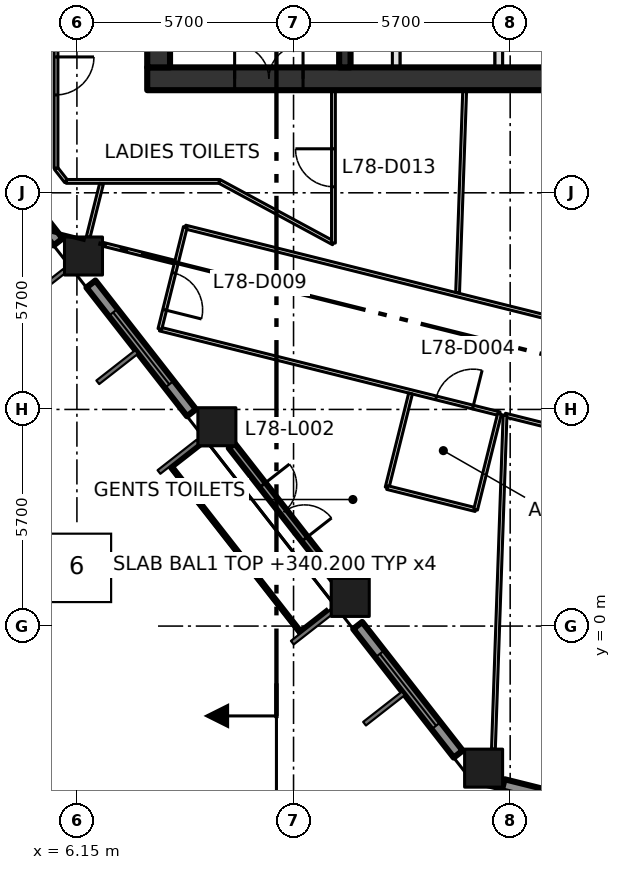
"""IFC4 building model, lengths in metres.
Left out: names, types, materials, properties, quantities, classifications, styles, units other than length and angle.
Written with IfcOpenShell. Run it as: python <this file> out.ifc"""

import sys

from ifc_helpers import new_model, si_unit, direction, frame, frame_2d, origin, origin_2d, place, context, subcontext, project, spatial, rectangle, extrude, element, fill, save


model = new_model("IFC4")
c1 = context("Model", 3, precision=1e-05, world=origin(), true_north=direction((0.0, 1.0)))
c2 = subcontext(c1, "Body", "Model", "MODEL_VIEW")
j1 = project(units=[si_unit("LENGTHUNIT", "METRE"), si_unit("PLANEANGLEUNIT", "RADIAN")], contexts=[c1])
p1 = place(None, origin())
s1 = spatial("IfcSite", under=j1, at=p1, CompositionType="ELEMENT")
p2 = place(p1, origin())
s2 = spatial("IfcBuilding", under=s1, at=p2, CompositionType="ELEMENT")
p3 = place(p2, frame((0.0, 0.0, 340.2)))
s3 = spatial("IfcBuildingStorey", under=s2, at=p3, CompositionType="ELEMENT", Elevation=340.2)
for number, where, z_axis, x_axis in (
    (1, (16.851, -3.738, 0.0), (0.0, 0.0, 1.0), (1.0, 0.0, 0.0)),
    (2, (13.342, 0.754, 0.0), (0.0, 0.0, 1.0), (1.0, 0.0, 0.0)),
    (3, (9.833, 5.245, 0.0), (0.0, 0.0, 1.0), (1.0, 0.0, 0.0)),
    (4, (6.323, 9.737, 0.0), (0.0, 0.0, 1.0), (1.0, 0.0, 0.0)),
):
    element("IfcColumn", number, at=place(p3, frame(where, z_axis=z_axis, x_axis=x_axis)), inside=s3, PredefinedType="COLUMN", context=c2, shape_type="SweptSolid", body=[
        extrude(rectangle(XDim=1.0, YDim=1.0, at=origin_2d()), origin(), (0.0, 0.0, 1.0), 4.2),
    ])
p4 = place(p3, frame((8.0, 14.4, -0.3), z_axis=(0.0, 0.0, 1.0), x_axis=(1.0, 0.0, 0.0)))
e5 = element("IfcWall", 5, at=p4, inside=s3, PredefinedType="SHEAR", context=c2, shape_type="SweptSolid", body=[
    extrude(rectangle(XDim=22.8, YDim=0.6, at=frame_2d((11.4, 0.0))), origin(), (0.0, 0.0, 1.0), 4.2),
])
p5 = place(p4, frame((2.3, 0.0, 0.3)))
e6 = element("IfcOpeningElement", 6, at=p5, cuts=e5, PredefinedType="OPENING", context=c2, shape_type="SweptSolid", body=[
    extrude(rectangle(XDim=1.8, YDim=2.1, at=frame_2d((0.9, 1.05))), frame((0.0, 0.31, 0.0), z_axis=(0.0, -1.0, 0.0), x_axis=(1.0, 0.0, 0.0)), (0.0, 0.0, 1.0), 0.62),
])
p6 = place(p3, frame((8.3, 14.7, -0.3), z_axis=(0.0, 0.0, 1.0), x_axis=(0.0, 1.0, 0.0)))
e7 = element("IfcWall", 7, at=p6, inside=s3, PredefinedType="SHEAR", context=c2, shape_type="SweptSolid", body=[
    extrude(rectangle(XDim=21.0, YDim=0.6, at=frame_2d((10.5, 0.0))), origin(), (0.0, 0.0, 1.0), 4.2),
])
p7 = place(p3, frame((13.2, 14.7, 0.0), z_axis=(0.0, 0.0, 1.0), x_axis=(0.0, 1.0, 0.0)))
e8 = element("IfcWall", 8, at=p7, inside=s3, PredefinedType="SHEAR", context=c2, shape_type="SweptSolid", body=[
    extrude(rectangle(XDim=21.0, YDim=0.3, at=frame_2d((10.5, 0.0))), origin(), (0.0, 0.0, 1.0), 3.9),
])
p8 = place(p7, frame((3.6, 0.0, 0.0)))
e9 = element("IfcOpeningElement", 9, at=p8, cuts=e8, PredefinedType="OPENING", context=c2, shape_type="SweptSolid", body=[
    extrude(rectangle(XDim=1.8, YDim=2.1, at=frame_2d((0.9, 1.05))), frame((0.0, 0.16, 0.0), z_axis=(0.0, -1.0, 0.0), x_axis=(1.0, 0.0, 0.0)), (0.0, 0.0, 1.0), 0.32),
])
p9 = place(p7, frame((11.7, 0.0, 0.0)))
e10 = element("IfcOpeningElement", 10, at=p9, cuts=e8, PredefinedType="OPENING", context=c2, shape_type="SweptSolid", body=[
    extrude(rectangle(XDim=1.2, YDim=2.1, at=frame_2d((0.6, 1.05))), frame((0.0, 0.16, 0.0), z_axis=(0.0, -1.0, 0.0), x_axis=(1.0, 0.0, 0.0)), (0.0, 0.0, 1.0), 0.32),
])
for number, where, z_axis, x_axis in (
    (11, (14.55, 14.7, 0.0), (0.0, 0.0, 1.0), (0.0, 1.0, 0.0)),
    (12, (17.25, 14.7, 0.0), (0.0, 0.0, 1.0), (0.0, 1.0, 0.0)),
):
    element("IfcWall", number, at=place(p3, frame(where, z_axis=z_axis, x_axis=x_axis)), inside=s3, PredefinedType="SOLIDWALL", context=c2, shape_type="SweptSolid", body=[
        extrude(rectangle(XDim=2.9, YDim=0.2, at=frame_2d((1.45, 0.0))), origin(), (0.0, 0.0, 1.0), 3.9),
    ])
p10 = place(p3, frame((3.01, 13.491, 0.0), z_axis=(0.0, 0.0, 1.0), x_axis=(0.615713519567, -0.787970089421, 0.0)))
e13 = element("IfcWall", 13, at=p10, inside=s3, PredefinedType="SOLIDWALL", context=c2, shape_type="SweptSolid", body=[
    extrude(rectangle(XDim=4.296, YDim=0.3, at=frame_2d((2.148, 0.0))), origin(), (0.0, 0.0, 1.0), 3.2),
])
p11 = place(p10, frame((0.948, 0.0, 0.8)))
e14 = element("IfcOpeningElement", 14, at=p11, cuts=e13, PredefinedType="OPENING", context=c2, shape_type="SweptSolid", body=[
    extrude(rectangle(XDim=2.4, YDim=2.1, at=frame_2d((1.2, 1.05))), frame((0.0, 0.16, 0.0), z_axis=(0.0, -1.0, 0.0), x_axis=(1.0, 0.0, 0.0)), (0.0, 0.0, 1.0), 0.32),
])
p12 = place(p3, frame((6.519, 9.0, 0.0), z_axis=(0.0, 0.0, 1.0), x_axis=(0.615634121154, -0.788032124263, 0.0)))
e15 = element("IfcWall", 15, at=p12, inside=s3, PredefinedType="SOLIDWALL", context=c2, shape_type="SweptSolid", body=[
    extrude(rectangle(XDim=4.298, YDim=0.3, at=frame_2d((2.149, 0.0))), origin(), (0.0, 0.0, 1.0), 3.2),
])
p13 = place(p12, frame((0.949, 0.0, 0.8)))
e16 = element("IfcOpeningElement", 16, at=p13, cuts=e15, PredefinedType="OPENING", context=c2, shape_type="SweptSolid", body=[
    extrude(rectangle(XDim=2.4, YDim=2.1, at=frame_2d((1.2, 1.05))), frame((0.0, 0.16, 0.0), z_axis=(0.0, -1.0, 0.0), x_axis=(1.0, 0.0, 0.0)), (0.0, 0.0, 1.0), 0.32),
])
p14 = place(p3, frame((10.224, 4.745, 0.0), z_axis=(0.0, 0.0, 1.0), x_axis=(0.615545644418, -0.788101236922, 0.0)))
e17 = element("IfcWall", 17, at=p14, inside=s3, PredefinedType="SOLIDWALL", context=c2, shape_type="SweptSolid", body=[
    extrude(rectangle(XDim=4.43, YDim=0.2, at=frame_2d((2.215, 0.0))), origin(), (0.0, 0.0, 1.0), 3.2),
])
p15 = place(p14, frame((1.315, 0.0, 0.0)))
e18 = element("IfcOpeningElement", 18, at=p15, cuts=e17, PredefinedType="OPENING", context=c2, shape_type="SweptSolid", body=[
    extrude(rectangle(XDim=1.8, YDim=2.9, at=frame_2d((0.9, 1.45))), frame((0.0, 0.11, 0.0), z_axis=(0.0, -1.0, 0.0), x_axis=(1.0, 0.0, 0.0)), (0.0, 0.0, 1.0), 0.22),
])
p16 = place(p3, frame((8.89, 4.292, 0.0), z_axis=(0.0, 0.0, 1.0), x_axis=(0.615636085037, -0.788030590016, 0.0)))
e19 = element("IfcWall", 19, at=p16, inside=s3, PredefinedType="SOLIDWALL", context=c2, shape_type="SweptSolid", body=[
    extrude(rectangle(XDim=5.359, YDim=0.4, at=frame_2d((2.679, 0.0))), origin(), (0.0, 0.0, 1.0), 0.3),
])
p17 = place(p3, frame((13.538, 0.016, 0.0), z_axis=(0.0, 0.0, 1.0), x_axis=(0.615713519567, -0.787970089421, 0.0)))
e20 = element("IfcWall", 20, at=p17, inside=s3, PredefinedType="SOLIDWALL", context=c2, shape_type="SweptSolid", body=[
    extrude(rectangle(XDim=4.296, YDim=0.3, at=frame_2d((2.148, 0.0))), origin(), (0.0, 0.0, 1.0), 3.2),
])
p18 = place(p17, frame((0.948, 0.0, 0.8)))
e21 = element("IfcOpeningElement", 21, at=p18, cuts=e20, PredefinedType="OPENING", context=c2, shape_type="SweptSolid", body=[
    extrude(rectangle(XDim=2.4, YDim=2.1, at=frame_2d((1.2, 1.05))), frame((0.0, 0.16, 0.0), z_axis=(0.0, -1.0, 0.0), x_axis=(1.0, 0.0, 0.0)), (0.0, 0.0, 1.0), 0.32),
])
p19 = place(p3, frame((17.367, -4.176, 0.0), z_axis=(0.0, 0.0, 1.0), x_axis=(0.970327846266, -0.241793032904, 0.0)))
e22 = element("IfcWall", 22, at=p19, inside=s3, PredefinedType="SOLIDWALL", context=c2, shape_type="SweptSolid", body=[
    extrude(rectangle(XDim=4.487, YDim=0.3, at=frame_2d((2.244, 0.0))), origin(), (0.0, 0.0, 1.0), 3.2),
])
p20 = place(p19, frame((1.044, 0.0, 0.8)))
e23 = element("IfcOpeningElement", 23, at=p20, cuts=e22, PredefinedType="OPENING", context=c2, shape_type="SweptSolid", body=[
    extrude(rectangle(XDim=2.4, YDim=2.1, at=frame_2d((1.2, 1.05))), frame((0.0, 0.16, 0.0), z_axis=(0.0, -1.0, 0.0), x_axis=(1.0, 0.0, 0.0)), (0.0, 0.0, 1.0), 0.32),
])
p21 = place(p3, frame((5.6, 12.044, 0.0), z_axis=(0.0, 0.0, 1.0), x_axis=(0.614328236968, -0.789050579661, 0.0)))
e24 = element("IfcWall", 24, at=p21, inside=s3, PredefinedType="PARTITIONING", context=c2, shape_type="SweptSolid", body=[
    extrude(rectangle(XDim=0.436, YDim=0.1, at=frame_2d((0.218, 0.0))), origin(), (0.0, 0.0, 1.0), 3.9),
])
p22 = place(p3, frame((5.6, 39.3, 0.0), z_axis=(0.0, 0.0, 1.0), x_axis=(0.0, -1.0, 0.0)))
e25 = element("IfcWall", 25, at=p22, inside=s3, PredefinedType="PARTITIONING", context=c2, shape_type="SweptSolid", body=[
    extrude(rectangle(XDim=27.256, YDim=0.1, at=frame_2d((13.628, 0.0))), origin(), (0.0, 0.0, 1.0), 3.9),
])
p23 = place(p22, frame((24.325, 0.0, 0.0)))
e26 = element("IfcOpeningElement", 26, at=p23, cuts=e25, PredefinedType="OPENING", context=c2, shape_type="SweptSolid", body=[
    extrude(rectangle(XDim=1.0, YDim=2.1, at=frame_2d((0.5, 1.05))), frame((0.0, 0.06, 0.0), z_axis=(0.0, -1.0, 0.0), x_axis=(1.0, 0.0, 0.0)), (0.0, 0.0, 1.0), 0.12),
])
p24 = place(p22, frame((12.825, 0.0, 0.0)))
e27 = element("IfcOpeningElement", 27, at=p24, cuts=e25, PredefinedType="OPENING", context=c2, shape_type="SweptSolid", body=[
    extrude(rectangle(XDim=1.0, YDim=2.1, at=frame_2d((0.5, 1.05))), frame((0.0, 0.06, 0.0), z_axis=(0.0, -1.0, 0.0), x_axis=(1.0, 0.0, 0.0)), (0.0, 0.0, 1.0), 0.12),
])
p25 = place(p3, frame((5.868, 11.7, 0.0), z_axis=(0.0, 0.0, 1.0), x_axis=(1.0, 0.0, 0.0)))
e28 = element("IfcWall", 28, at=p25, inside=s3, PredefinedType="PARTITIONING", context=c2, shape_type="SweptSolid", body=[
    extrude(rectangle(XDim=4.032, YDim=0.1, at=frame_2d((2.016, 0.0))), origin(), (0.0, 0.0, 1.0), 3.9),
])
p26 = place(p3, frame((8.333, 7.815, 0.0), z_axis=(0.0, 0.0, 1.0), x_axis=(0.970301331289, -0.241899414012, 0.0)))
e29 = element("IfcWall", 29, at=p26, inside=s3, PredefinedType="PARTITIONING", context=c2, shape_type="SweptSolid", body=[
    extrude(rectangle(XDim=9.21, YDim=0.1, at=frame_2d((4.605, 0.0))), origin(), (0.0, 0.0, 1.0), 3.9),
])
p27 = place(p26, frame((7.49, 0.0, 0.0)))
e30 = element("IfcOpeningElement", 30, at=p27, cuts=e29, PredefinedType="OPENING", context=c2, shape_type="SweptSolid", body=[
    extrude(rectangle(XDim=1.0, YDim=2.1, at=frame_2d((0.5, 1.05))), frame((0.0, 0.06, 0.0), z_axis=(0.0, -1.0, 0.0), x_axis=(1.0, 0.0, 0.0)), (0.0, 0.0, 1.0), 0.12),
])
p28 = place(p3, frame((9.002, 10.499, 0.0), z_axis=(0.0, 0.0, 1.0), x_axis=(0.970298340477, -0.241911410372, 0.0)))
e31 = element("IfcWall", 31, at=p28, inside=s3, PredefinedType="PARTITIONING", context=c2, shape_type="SweptSolid", body=[
    extrude(rectangle(XDim=19.88, YDim=0.1, at=frame_2d((9.94, 0.0))), origin(), (0.0, 0.0, 1.0), 3.9),
])
p29 = place(p28, frame((12.749, 0.0, 0.0)))
e32 = element("IfcOpeningElement", 32, at=p29, cuts=e31, PredefinedType="OPENING", context=c2, shape_type="SweptSolid", body=[
    extrude(rectangle(XDim=1.8, YDim=2.1, at=frame_2d((0.9, 1.05))), frame((0.0, 0.06, 0.0), z_axis=(0.0, -1.0, 0.0), x_axis=(1.0, 0.0, 0.0)), (0.0, 0.0, 1.0), 0.12),
])
p30 = place(p3, frame((9.002, 10.499, 0.0), z_axis=(0.0, 0.0, 1.0), x_axis=(-0.2418294893, -0.970318761081, 0.0)))
e33 = element("IfcWall", 33, at=p30, inside=s3, PredefinedType="PARTITIONING", context=c2, shape_type="SweptSolid", body=[
    extrude(rectangle(XDim=2.766, YDim=0.1, at=frame_2d((1.383, 0.0))), origin(), (0.0, 0.0, 1.0), 3.9),
])
p31 = place(p30, frame((1.244, 0.0, 0.0)))
e34 = element("IfcOpeningElement", 34, at=p31, cuts=e33, PredefinedType="OPENING", context=c2, shape_type="SweptSolid", body=[
    extrude(rectangle(XDim=1.0, YDim=2.1, at=frame_2d((0.5, 1.05))), frame((0.0, 0.06, 0.0), z_axis=(0.0, -1.0, 0.0), x_axis=(1.0, 0.0, 0.0)), (0.0, 0.0, 1.0), 0.12),
])
p32 = place(p3, frame((9.9, 11.7, 0.0), z_axis=(0.0, 0.0, 1.0), x_axis=(0.87965147249, -0.475618846291, 0.0)))
e35 = element("IfcWall", 35, at=p32, inside=s3, PredefinedType="PARTITIONING", context=c2, shape_type="SweptSolid", body=[
    extrude(rectangle(XDim=3.41, YDim=0.1, at=frame_2d((1.705, 0.0))), origin(), (0.0, 0.0, 1.0), 3.9),
])
p33 = place(p3, frame((12.9, 10.078, 0.0), z_axis=(0.0, 0.0, 1.0), x_axis=(0.0, 1.0, 0.0)))
e36 = element("IfcWall", 36, at=p33, inside=s3, PredefinedType="PARTITIONING", context=c2, shape_type="SweptSolid", body=[
    extrude(rectangle(XDim=4.022, YDim=0.1, at=frame_2d((2.011, 0.0))), origin(), (0.0, 0.0, 1.0), 3.9),
])
p34 = place(p33, frame((1.48, 0.0, 0.0)))
e37 = element("IfcOpeningElement", 37, at=p34, cuts=e36, PredefinedType="OPENING", context=c2, shape_type="SweptSolid", body=[
    extrude(rectangle(XDim=1.0, YDim=2.1, at=frame_2d((0.5, 1.05))), frame((0.0, 0.06, 0.0), z_axis=(0.0, -1.0, 0.0), x_axis=(1.0, 0.0, 0.0)), (0.0, 0.0, 1.0), 0.12),
])
p35 = place(p3, frame((17.415, 5.551, 0.0), z_axis=(0.0, 0.0, 1.0), x_axis=(0.970298198748, -0.241911978838, 0.0)))
e38 = element("IfcWall", 38, at=p35, inside=s3, PredefinedType="PARTITIONING", context=c2, shape_type="SweptSolid", body=[
    extrude(rectangle(XDim=1.658, YDim=0.1, at=frame_2d((0.829, 0.0))), origin(), (0.0, 0.0, 1.0), 3.9),
])
p36 = place(p3, frame((6.797, 11.638, 0.0), z_axis=(0.0, 0.0, 1.0), x_axis=(-0.242456058691, -0.970162388265, 0.0)))
e39 = element("IfcWall", 39, at=p36, inside=s3, PredefinedType="PARTITIONING", context=c2, shape_type="SweptSolid", body=[
    extrude(rectangle(XDim=1.444, YDim=0.1, at=frame_2d((0.722, 0.0))), origin(), (0.0, 0.0, 1.0), 3.9),
])
p37 = place(p3, frame((8.72, 9.575, 0.0), z_axis=(0.0, 0.0, 1.0), x_axis=(-0.970274576003, 0.242006708918, 0.0)))
e40 = element("IfcWall", 40, at=p37, inside=s3, PredefinedType="PARTITIONING", context=c2, shape_type="SweptSolid", body=[
    extrude(rectangle(XDim=1.955, YDim=0.1, at=frame_2d((0.978, 0.0))), origin(), (0.0, 0.0, 1.0), 3.9),
])
p38 = place(p3, frame((14.312, 3.645, 0.0), z_axis=(0.0, 0.0, 1.0), x_axis=(0.241972320765, 0.970283152478, 0.0)))
e41 = element("IfcWall", 41, at=p38, inside=s3, PredefinedType="PARTITIONING", context=c2, shape_type="SweptSolid", body=[
    extrude(rectangle(XDim=2.55, YDim=0.1, at=frame_2d((1.275, 0.0))), origin(), (0.0, 0.0, 1.0), 3.9),
])
p39 = place(p3, frame((16.167, 8.775, 0.0), z_axis=(0.0, 0.0, 1.0), x_axis=(0.034913599617, 0.999390334435, 0.0)))
e42 = element("IfcWall", 42, at=p39, inside=s3, PredefinedType="PARTITIONING", context=c2, shape_type="SweptSolid", body=[
    extrude(rectangle(XDim=5.328, YDim=0.1, at=frame_2d((2.664, 0.0))), origin(), (0.0, 0.0, 1.0), 3.9),
])
p40 = place(p3, frame((16.641, 3.064, 0.0), z_axis=(0.0, 0.0, 1.0), x_axis=(-0.970262034576, 0.242056985565, 0.0)))
e43 = element("IfcWall", 43, at=p40, inside=s3, PredefinedType="PARTITIONING", context=c2, shape_type="SweptSolid", body=[
    extrude(rectangle(XDim=2.4, YDim=0.1, at=frame_2d((1.2, 0.0))), origin(), (0.0, 0.0, 1.0), 3.9),
])
p41 = place(p3, frame((17.109, -3.238, 0.0), z_axis=(0.0, 0.0, 1.0), x_axis=(0.034812219839, 0.999393870979, 0.0)))
e44 = element("IfcWall", 44, at=p41, inside=s3, PredefinedType="PARTITIONING", context=c2, shape_type="SweptSolid", body=[
    extrude(rectangle(XDim=8.794, YDim=0.1, at=frame_2d((4.397, 0.0))), origin(), (0.0, 0.0, 1.0), 3.9),
])
p42 = place(p3, frame((17.27, 5.587, 0.0), z_axis=(0.0, 0.0, 1.0), x_axis=(-0.241872782222, -0.970307970296, 0.0)))
e45 = element("IfcWall", 45, at=p42, inside=s3, PredefinedType="PARTITIONING", context=c2, shape_type="SweptSolid", body=[
    extrude(rectangle(XDim=2.6, YDim=0.1, at=frame_2d((1.3, 0.0))), origin(), (0.0, 0.0, 1.0), 3.9),
])
p43 = place(p5, origin())
e46 = element("IfcDoor", 46, at=p43, inside=s3, OperationType="DOUBLE_DOOR_SINGLE_SWING", PredefinedType="DOOR", context=c2, shape_type="SweptSolid", body=[
    extrude(rectangle(XDim=1.8, YDim=2.1, at=frame_2d((0.9, 1.05))), frame((0.0, 0.025, 0.0), z_axis=(0.0, -1.0, 0.0), x_axis=(1.0, 0.0, 0.0)), (0.0, 0.0, 1.0), 0.05),
])
fill(e6, e46)
p44 = place(p13, origin())
e47 = element("IfcWindow", 47, at=p44, inside=s3, PartitioningType="DOUBLE_PANEL_VERTICAL", PredefinedType="WINDOW", context=c2, shape_type="SweptSolid", body=[
    extrude(rectangle(XDim=2.4, YDim=2.1, at=frame_2d((1.2, 1.05))), frame((0.0, 0.03, 0.0), z_axis=(0.0, -1.0, 0.0), x_axis=(1.0, 0.0, 0.0)), (0.0, 0.0, 1.0), 0.06),
])
fill(e16, e47)
p45 = place(p15, origin())
e48 = element("IfcDoor", 48, at=p45, inside=s3, OperationType="DOUBLE_DOOR_SINGLE_SWING", PredefinedType="DOOR", context=c2, shape_type="SweptSolid", body=[
    extrude(rectangle(XDim=1.8, YDim=2.9, at=frame_2d((0.9, 1.45))), frame((0.0, 0.025, 0.0), z_axis=(0.0, -1.0, 0.0), x_axis=(1.0, 0.0, 0.0)), (0.0, 0.0, 1.0), 0.05),
])
fill(e18, e48)
p46 = place(p18, origin())
e49 = element("IfcWindow", 49, at=p46, inside=s3, PartitioningType="DOUBLE_PANEL_VERTICAL", PredefinedType="WINDOW", context=c2, shape_type="SweptSolid", body=[
    extrude(rectangle(XDim=2.4, YDim=2.1, at=frame_2d((1.2, 1.05))), frame((0.0, 0.03, 0.0), z_axis=(0.0, -1.0, 0.0), x_axis=(1.0, 0.0, 0.0)), (0.0, 0.0, 1.0), 0.06),
])
fill(e21, e49)
p47 = place(p27, origin())
e50 = element("IfcDoor", 50, at=p47, inside=s3, OperationType="SINGLE_SWING_RIGHT", PredefinedType="DOOR", context=c2, shape_type="SweptSolid", body=[
    extrude(rectangle(XDim=1.0, YDim=2.1, at=frame_2d((0.5, 1.05))), frame((0.0, 0.025, 0.0), z_axis=(0.0, -1.0, 0.0), x_axis=(1.0, 0.0, 0.0)), (0.0, 0.0, 1.0), 0.05),
])
fill(e30, e50)
p48 = place(p31, origin())
e51 = element("IfcDoor", 51, at=p48, inside=s3, OperationType="SINGLE_SWING_RIGHT", PredefinedType="DOOR", context=c2, shape_type="SweptSolid", body=[
    extrude(rectangle(XDim=1.0, YDim=2.1, at=frame_2d((0.5, 1.05))), frame((0.0, 0.025, 0.0), z_axis=(0.0, -1.0, 0.0), x_axis=(1.0, 0.0, 0.0)), (0.0, 0.0, 1.0), 0.05),
])
fill(e34, e51)
p49 = place(p23, origin())
e52 = element("IfcDoor", 52, at=p49, inside=s3, OperationType="SINGLE_SWING_LEFT", PredefinedType="DOOR", context=c2, shape_type="SweptSolid", body=[
    extrude(rectangle(XDim=1.0, YDim=2.1, at=frame_2d((0.5, 1.05))), frame((0.0, 0.025, 0.0), z_axis=(0.0, -1.0, 0.0), x_axis=(1.0, 0.0, 0.0)), (0.0, 0.0, 1.0), 0.05),
])
fill(e26, e52)
p50 = place(p34, origin())
e53 = element("IfcDoor", 53, at=p50, inside=s3, OperationType="SINGLE_SWING_RIGHT", PredefinedType="DOOR", context=c2, shape_type="SweptSolid", body=[
    extrude(rectangle(XDim=1.0, YDim=2.1, at=frame_2d((0.5, 1.05))), frame((0.0, 0.025, 0.0), z_axis=(0.0, -1.0, 0.0), x_axis=(1.0, 0.0, 0.0)), (0.0, 0.0, 1.0), 0.05),
])
fill(e37, e53)
save(model, sys.argv[1])
